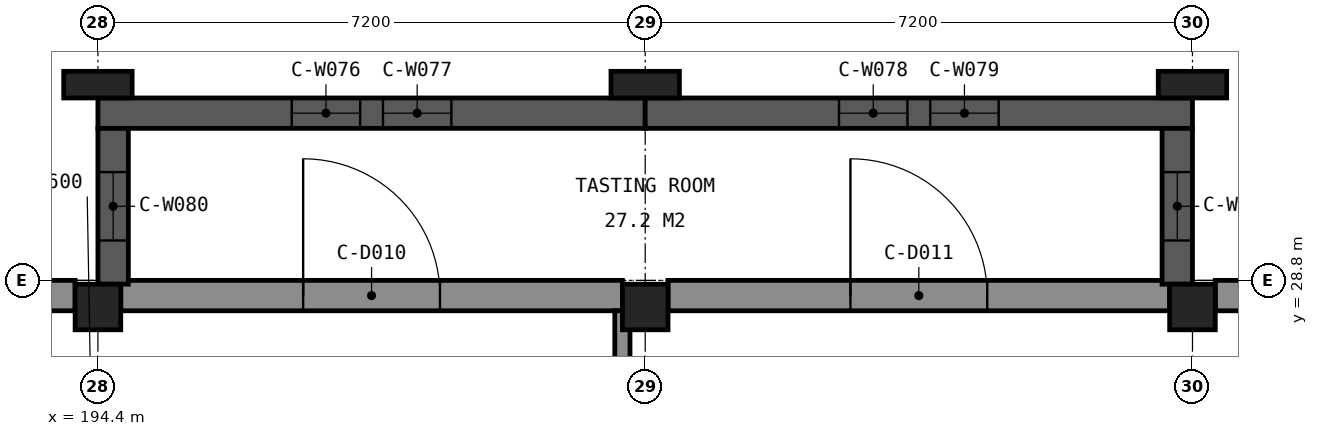
"""IFC4 building model, lengths in metres.
Left out: names, types, materials, properties, quantities, classifications, styles, units other than length and angle.
Written with IfcOpenShell. Run it as: python <this file> out.ifc"""

import sys

from ifc_helpers import new_model, si_unit, direction, frame, frame_2d, origin, origin_2d, place, context, subcontext, project, spatial, rectangle, extrude, element, fill, save


model = new_model("IFC4")
c1 = context("Model", 3, precision=1e-05, world=origin(), true_north=direction((0.0, 1.0)))
c2 = subcontext(c1, "Body", "Model", "MODEL_VIEW")
j1 = project(units=[si_unit("LENGTHUNIT", "METRE"), si_unit("PLANEANGLEUNIT", "RADIAN")], contexts=[c1])
p1 = place(None, origin())
s1 = spatial("IfcSite", under=j1, at=p1, CompositionType="ELEMENT")
p2 = place(p1, origin())
s2 = spatial("IfcBuilding", under=s1, at=p2, CompositionType="ELEMENT")
p3 = place(p2, frame((0.0, 0.0, 9.6)))
s3 = spatial("IfcBuildingStorey", under=s2, at=p3, CompositionType="ELEMENT", Elevation=9.6)
for number, where, z_axis, x_axis in (
    (1, (194.4, 28.45, 0.0), (0.0, 0.0, 1.0), (1.0, 0.0, 0.0)),
    (2, (201.6, 28.45, 0.0), (0.0, 0.0, 1.0), (1.0, 0.0, 0.0)),
    (3, (208.8, 28.45, 0.0), (0.0, 0.0, 1.0), (1.0, 0.0, 0.0)),
):
    element("IfcColumn", number, at=place(p3, frame(where, z_axis=z_axis, x_axis=x_axis)), inside=s3, PredefinedType="COLUMN", context=c2, shape_type="SweptSolid", body=[
        extrude(rectangle(XDim=0.6, YDim=0.6, at=origin_2d()), origin(), (0.0, 0.0, 1.0), 4.8),
    ])
p4 = place(p3, frame((187.5, 28.6, 0.0), z_axis=(0.0, 0.0, 1.0), x_axis=(1.0, 0.0, 0.0)))
e4 = element("IfcWall", 4, at=p4, inside=s3, PredefinedType="SOLIDWALL", context=c2, shape_type="SweptSolid", body=[
    extrude(rectangle(XDim=6.6, YDim=0.4, at=frame_2d((3.3, 0.0))), origin(), (0.0, 0.0, 1.0), 3.95),
])
p5 = place(p4, frame((2.25, 0.0, 0.9)))
e5 = element("IfcOpeningElement", 5, at=p5, cuts=e4, PredefinedType="OPENING", context=c2, shape_type="SweptSolid", body=[
    extrude(rectangle(XDim=0.9, YDim=2.7, at=frame_2d((0.45, 1.35))), frame((0.0, 0.21, 0.0), z_axis=(0.0, -1.0, 0.0), x_axis=(1.0, 0.0, 0.0)), (0.0, 0.0, 1.0), 0.42),
])
p6 = place(p4, frame((3.45, 0.0, 0.9)))
e6 = element("IfcOpeningElement", 6, at=p6, cuts=e4, PredefinedType="OPENING", context=c2, shape_type="SweptSolid", body=[
    extrude(rectangle(XDim=0.9, YDim=2.7, at=frame_2d((0.45, 1.35))), frame((0.0, 0.21, 0.0), z_axis=(0.0, -1.0, 0.0), x_axis=(1.0, 0.0, 0.0)), (0.0, 0.0, 1.0), 0.42),
])
p7 = place(p3, frame((194.7, 28.6, 0.0), z_axis=(0.0, 0.0, 1.0), x_axis=(1.0, 0.0, 0.0)))
e7 = element("IfcWall", 7, at=p7, inside=s3, PredefinedType="SOLIDWALL", context=c2, shape_type="SweptSolid", body=[
    extrude(rectangle(XDim=6.6, YDim=0.4, at=frame_2d((3.3, 0.0))), origin(), (0.0, 0.0, 1.0), 3.95),
])
p8 = place(p7, frame((2.4, 0.0, 0.0)))
e8 = element("IfcOpeningElement", 8, at=p8, cuts=e7, PredefinedType="OPENING", context=c2, shape_type="SweptSolid", body=[
    extrude(rectangle(XDim=1.8, YDim=2.1, at=frame_2d((0.9, 1.05))), frame((0.0, 0.21, 0.0), z_axis=(0.0, -1.0, 0.0), x_axis=(1.0, 0.0, 0.0)), (0.0, 0.0, 1.0), 0.42),
])
p9 = place(p3, frame((201.9, 28.6, 0.0), z_axis=(0.0, 0.0, 1.0), x_axis=(1.0, 0.0, 0.0)))
e9 = element("IfcWall", 9, at=p9, inside=s3, PredefinedType="SOLIDWALL", context=c2, shape_type="SweptSolid", body=[
    extrude(rectangle(XDim=6.6, YDim=0.4, at=frame_2d((3.3, 0.0))), origin(), (0.0, 0.0, 1.0), 3.95),
])
p10 = place(p9, frame((2.4, 0.0, 0.0)))
e10 = element("IfcOpeningElement", 10, at=p10, cuts=e9, PredefinedType="OPENING", context=c2, shape_type="SweptSolid", body=[
    extrude(rectangle(XDim=1.8, YDim=2.1, at=frame_2d((0.9, 1.05))), frame((0.0, 0.21, 0.0), z_axis=(0.0, -1.0, 0.0), x_axis=(1.0, 0.0, 0.0)), (0.0, 0.0, 1.0), 0.42),
])
p11 = place(p3, frame((209.1, 28.6, 0.0), z_axis=(0.0, 0.0, 1.0), x_axis=(1.0, 0.0, 0.0)))
e11 = element("IfcWall", 11, at=p11, inside=s3, PredefinedType="SOLIDWALL", context=c2, shape_type="SweptSolid", body=[
    extrude(rectangle(XDim=6.6, YDim=0.4, at=frame_2d((3.3, 0.0))), origin(), (0.0, 0.0, 1.0), 3.95),
])
p12 = place(p11, frame((2.25, 0.0, 0.9)))
e12 = element("IfcOpeningElement", 12, at=p12, cuts=e11, PredefinedType="OPENING", context=c2, shape_type="SweptSolid", body=[
    extrude(rectangle(XDim=0.9, YDim=2.7, at=frame_2d((0.45, 1.35))), frame((0.0, 0.21, 0.0), z_axis=(0.0, -1.0, 0.0), x_axis=(1.0, 0.0, 0.0)), (0.0, 0.0, 1.0), 0.42),
])
p13 = place(p11, frame((3.45, 0.0, 0.9)))
e13 = element("IfcOpeningElement", 13, at=p13, cuts=e11, PredefinedType="OPENING", context=c2, shape_type="SweptSolid", body=[
    extrude(rectangle(XDim=0.9, YDim=2.7, at=frame_2d((0.45, 1.35))), frame((0.0, 0.21, 0.0), z_axis=(0.0, -1.0, 0.0), x_axis=(1.0, 0.0, 0.0)), (0.0, 0.0, 1.0), 0.42),
])
p14 = place(p3, frame((194.4, 31.0, 0.0), z_axis=(0.0, 0.0, 1.0), x_axis=(1.0, 0.0, 0.0)))
e14 = element("IfcWall", 14, at=p14, inside=s3, PredefinedType="SOLIDWALL", context=c2, shape_type="SweptSolid", body=[
    extrude(rectangle(XDim=7.2, YDim=0.4, at=frame_2d((3.6, 0.0))), origin(), (0.0, 0.0, 1.0), 4.55),
])
p15 = place(p14, frame((2.55, 0.0, 0.9)))
e15 = element("IfcOpeningElement", 15, at=p15, cuts=e14, PredefinedType="OPENING", context=c2, shape_type="SweptSolid", body=[
    extrude(rectangle(XDim=0.9, YDim=2.7, at=frame_2d((0.45, 1.35))), frame((0.0, 0.21, 0.0), z_axis=(0.0, -1.0, 0.0), x_axis=(1.0, 0.0, 0.0)), (0.0, 0.0, 1.0), 0.42),
])
p16 = place(p14, frame((3.75, 0.0, 0.9)))
e16 = element("IfcOpeningElement", 16, at=p16, cuts=e14, PredefinedType="OPENING", context=c2, shape_type="SweptSolid", body=[
    extrude(rectangle(XDim=0.9, YDim=2.7, at=frame_2d((0.45, 1.35))), frame((0.0, 0.21, 0.0), z_axis=(0.0, -1.0, 0.0), x_axis=(1.0, 0.0, 0.0)), (0.0, 0.0, 1.0), 0.42),
])
p17 = place(p3, frame((201.6, 31.0, 0.0), z_axis=(0.0, 0.0, 1.0), x_axis=(1.0, 0.0, 0.0)))
e17 = element("IfcWall", 17, at=p17, inside=s3, PredefinedType="SOLIDWALL", context=c2, shape_type="SweptSolid", body=[
    extrude(rectangle(XDim=7.2, YDim=0.4, at=frame_2d((3.6, 0.0))), origin(), (0.0, 0.0, 1.0), 4.55),
])
p18 = place(p17, frame((2.55, 0.0, 0.9)))
e18 = element("IfcOpeningElement", 18, at=p18, cuts=e17, PredefinedType="OPENING", context=c2, shape_type="SweptSolid", body=[
    extrude(rectangle(XDim=0.9, YDim=2.7, at=frame_2d((0.45, 1.35))), frame((0.0, 0.21, 0.0), z_axis=(0.0, -1.0, 0.0), x_axis=(1.0, 0.0, 0.0)), (0.0, 0.0, 1.0), 0.42),
])
p19 = place(p17, frame((3.75, 0.0, 0.9)))
e19 = element("IfcOpeningElement", 19, at=p19, cuts=e17, PredefinedType="OPENING", context=c2, shape_type="SweptSolid", body=[
    extrude(rectangle(XDim=0.9, YDim=2.7, at=frame_2d((0.45, 1.35))), frame((0.0, 0.21, 0.0), z_axis=(0.0, -1.0, 0.0), x_axis=(1.0, 0.0, 0.0)), (0.0, 0.0, 1.0), 0.42),
])
p20 = place(p3, frame((194.6, 28.75, 0.0), z_axis=(0.0, 0.0, 1.0), x_axis=(0.0, 1.0, 0.0)))
e20 = element("IfcWall", 20, at=p20, inside=s3, PredefinedType="SOLIDWALL", context=c2, shape_type="SweptSolid", body=[
    extrude(rectangle(XDim=2.05, YDim=0.4, at=frame_2d((1.025, 0.0))), origin(), (0.0, 0.0, 1.0), 4.55),
])
p21 = place(p20, frame((0.575, 0.0, 0.9)))
e21 = element("IfcOpeningElement", 21, at=p21, cuts=e20, PredefinedType="OPENING", context=c2, shape_type="SweptSolid", body=[
    extrude(rectangle(XDim=0.9, YDim=2.7, at=frame_2d((0.45, 1.35))), frame((0.0, 0.21, 0.0), z_axis=(0.0, -1.0, 0.0), x_axis=(1.0, 0.0, 0.0)), (0.0, 0.0, 1.0), 0.42),
])
p22 = place(p3, frame((208.6, 30.8, 0.0), z_axis=(0.0, 0.0, 1.0), x_axis=(0.0, -1.0, 0.0)))
e22 = element("IfcWall", 22, at=p22, inside=s3, PredefinedType="SOLIDWALL", context=c2, shape_type="SweptSolid", body=[
    extrude(rectangle(XDim=2.05, YDim=0.4, at=frame_2d((1.025, 0.0))), origin(), (0.0, 0.0, 1.0), 4.55),
])
p23 = place(p22, frame((0.575, 0.0, 0.9)))
e23 = element("IfcOpeningElement", 23, at=p23, cuts=e22, PredefinedType="OPENING", context=c2, shape_type="SweptSolid", body=[
    extrude(rectangle(XDim=0.9, YDim=2.7, at=frame_2d((0.45, 1.35))), frame((0.0, 0.21, 0.0), z_axis=(0.0, -1.0, 0.0), x_axis=(1.0, 0.0, 0.0)), (0.0, 0.0, 1.0), 0.42),
])
for number, where, z_axis, x_axis in (
    (24, (194.4, 31.375, 0.0), (0.0, 0.0, 1.0), (1.0, 0.0, 0.0)),
    (25, (201.6, 31.375, 0.0), (0.0, 0.0, 1.0), (1.0, 0.0, 0.0)),
    (26, (208.8, 31.375, 0.0), (0.0, 0.0, 1.0), (1.0, 0.0, 0.0)),
):
    element("IfcColumn", number, at=place(p3, frame(where, z_axis=z_axis, x_axis=x_axis)), inside=s3, PredefinedType="PILASTER", context=c2, shape_type="SweptSolid", body=[
        extrude(rectangle(XDim=0.9, YDim=0.35, at=origin_2d()), origin(), (0.0, 0.0, 1.0), 4.8),
    ])
p24 = place(p3, frame((201.3, 28.4, 0.0), z_axis=(0.0, 0.0, 1.0), x_axis=(0.0, -1.0, 0.0)))
e27 = element("IfcWall", 27, at=p24, inside=s3, PredefinedType="PARTITIONING", context=c2, shape_type="SweptSolid", body=[
    extrude(rectangle(XDim=9.7, YDim=0.2, at=frame_2d((4.85, 0.0))), origin(), (0.0, 0.0, 1.0), 3.95),
])
p25 = place(p8, origin())
e28 = element("IfcDoor", 28, at=p25, inside=s3, OperationType="NOTDEFINED", PredefinedType="DOOR", context=c2, shape_type="SweptSolid", body=[
    extrude(rectangle(XDim=1.8, YDim=2.1, at=frame_2d((0.9, 1.05))), frame((0.0, 0.025, 0.0), z_axis=(0.0, -1.0, 0.0), x_axis=(1.0, 0.0, 0.0)), (0.0, 0.0, 1.0), 0.05),
])
fill(e8, e28)
p26 = place(p10, origin())
e29 = element("IfcDoor", 29, at=p26, inside=s3, OperationType="NOTDEFINED", PredefinedType="DOOR", context=c2, shape_type="SweptSolid", body=[
    extrude(rectangle(XDim=1.8, YDim=2.1, at=frame_2d((0.9, 1.05))), frame((0.0, 0.025, 0.0), z_axis=(0.0, -1.0, 0.0), x_axis=(1.0, 0.0, 0.0)), (0.0, 0.0, 1.0), 0.05),
])
fill(e10, e29)
p27 = place(p15, origin())
e30 = element("IfcWindow", 30, at=p27, inside=s3, PartitioningType="SINGLE_PANEL", PredefinedType="WINDOW", context=c2, shape_type="SweptSolid", body=[
    extrude(rectangle(XDim=0.9, YDim=2.7, at=frame_2d((0.45, 1.35))), frame((0.0, -0.09, 0.0), z_axis=(0.0, -1.0, 0.0), x_axis=(1.0, 0.0, 0.0)), (0.0, 0.0, 1.0), 0.06),
])
fill(e15, e30)
p28 = place(p16, origin())
e31 = element("IfcWindow", 31, at=p28, inside=s3, PartitioningType="SINGLE_PANEL", PredefinedType="WINDOW", context=c2, shape_type="SweptSolid", body=[
    extrude(rectangle(XDim=0.9, YDim=2.7, at=frame_2d((0.45, 1.35))), frame((0.0, -0.09, 0.0), z_axis=(0.0, -1.0, 0.0), x_axis=(1.0, 0.0, 0.0)), (0.0, 0.0, 1.0), 0.06),
])
fill(e16, e31)
p29 = place(p18, origin())
e32 = element("IfcWindow", 32, at=p29, inside=s3, PartitioningType="SINGLE_PANEL", PredefinedType="WINDOW", context=c2, shape_type="SweptSolid", body=[
    extrude(rectangle(XDim=0.9, YDim=2.7, at=frame_2d((0.45, 1.35))), frame((0.0, -0.09, 0.0), z_axis=(0.0, -1.0, 0.0), x_axis=(1.0, 0.0, 0.0)), (0.0, 0.0, 1.0), 0.06),
])
fill(e18, e32)
p30 = place(p19, origin())
e33 = element("IfcWindow", 33, at=p30, inside=s3, PartitioningType="SINGLE_PANEL", PredefinedType="WINDOW", context=c2, shape_type="SweptSolid", body=[
    extrude(rectangle(XDim=0.9, YDim=2.7, at=frame_2d((0.45, 1.35))), frame((0.0, -0.09, 0.0), z_axis=(0.0, -1.0, 0.0), x_axis=(1.0, 0.0, 0.0)), (0.0, 0.0, 1.0), 0.06),
])
fill(e19, e33)
p31 = place(p21, origin())
e34 = element("IfcWindow", 34, at=p31, inside=s3, PartitioningType="SINGLE_PANEL", PredefinedType="WINDOW", context=c2, shape_type="SweptSolid", body=[
    extrude(rectangle(XDim=0.9, YDim=2.7, at=frame_2d((0.45, 1.35))), frame((0.0, -0.09, 0.0), z_axis=(0.0, -1.0, 0.0), x_axis=(1.0, 0.0, 0.0)), (0.0, 0.0, 1.0), 0.06),
])
fill(e21, e34)
p32 = place(p23, origin())
e35 = element("IfcWindow", 35, at=p32, inside=s3, PartitioningType="SINGLE_PANEL", PredefinedType="WINDOW", context=c2, shape_type="SweptSolid", body=[
    extrude(rectangle(XDim=0.9, YDim=2.7, at=frame_2d((0.45, 1.35))), frame((0.0, -0.09, 0.0), z_axis=(0.0, -1.0, 0.0), x_axis=(1.0, 0.0, 0.0)), (0.0, 0.0, 1.0), 0.06),
])
fill(e23, e35)
save(model, sys.argv[1])
